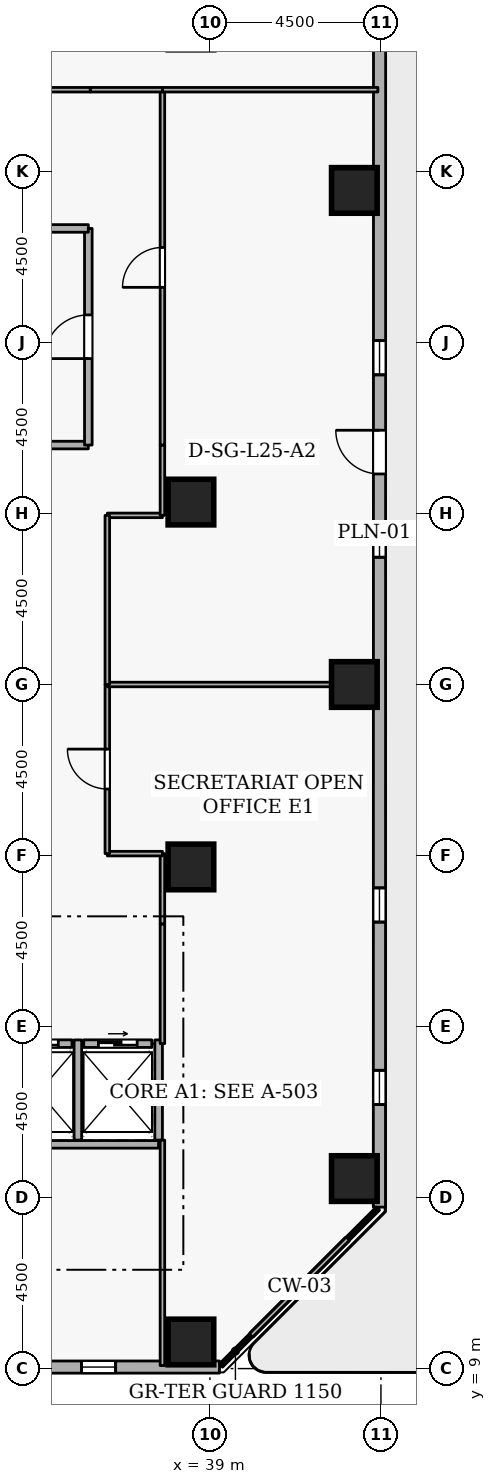
"""IFC4 building model, lengths in metres.
Left out: names, types, materials, properties, quantities, classifications, styles, units other than length and angle.
Written with IfcOpenShell. Run it as: python <this file> out.ifc"""

import sys

from ifc_helpers import new_model, si_unit, direction, frame, frame_2d, origin, origin_2d, place, context, subcontext, project, spatial, rectangle, extrude, element, fill, save


model = new_model("IFC4")
c1 = context("Model", 3, precision=1e-05, world=origin(), true_north=direction((0.0, 1.0)))
c2 = subcontext(c1, "Body", "Model", "MODEL_VIEW")
j1 = project(units=[si_unit("LENGTHUNIT", "METRE"), si_unit("PLANEANGLEUNIT", "RADIAN")], contexts=[c1])
p1 = place(None, origin())
s1 = spatial("IfcSite", under=j1, at=p1, CompositionType="ELEMENT")
p2 = place(p1, origin())
s2 = spatial("IfcBuilding", under=s1, at=p2, CompositionType="ELEMENT")
p3 = place(p2, frame((0.0, 0.0, 98.1)))
s3 = spatial("IfcBuildingStorey", under=s2, at=p3, CompositionType="ELEMENT", Elevation=98.1)
for number, where, z_axis, x_axis in (
    (1, (38.5, 9.7, 0.0), (0.0, 0.0, 1.0), (1.0, 0.0, 0.0)),
    (2, (42.8, 14.0, 0.0), (0.0, 0.0, 1.0), (1.0, 0.0, 0.0)),
    (3, (42.8, 27.0, 0.0), (0.0, 0.0, 1.0), (1.0, 0.0, 0.0)),
    (4, (42.8, 40.0, 0.0), (0.0, 0.0, 1.0), (1.0, 0.0, 0.0)),
    (5, (38.5, 22.2, 0.0), (0.0, 0.0, 1.0), (1.0, 0.0, 0.0)),
    (6, (38.5, 31.8, 0.0), (0.0, 0.0, 1.0), (1.0, 0.0, 0.0)),
):
    element("IfcColumn", number, at=place(p3, frame(where, z_axis=z_axis, x_axis=x_axis)), inside=s3, PredefinedType="COLUMN", context=c2, shape_type="SweptSolid", body=[
        extrude(rectangle(XDim=1.2, YDim=1.2, at=origin_2d()), origin(), (0.0, 0.0, 1.0), 3.6),
    ])
p4 = place(p3, frame((4.119, 9.035, 0.0), z_axis=(0.0, 0.0, 1.0), x_axis=(0.999999989352, 0.000145929605, 0.0)))
e7 = element("IfcWall", 7, at=p4, inside=s3, PredefinedType="STANDARD", context=c2, shape_type="SweptSolid", body=[
    extrude(rectangle(XDim=35.133, YDim=0.32, at=frame_2d((17.566, 0.0))), origin(), (0.0, 0.0, 1.0), 2.7),
])
p5 = place(p4, frame((2.7, 0.0, 0.72)))
e8 = element("IfcOpeningElement", 8, at=p5, cuts=e7, PredefinedType="OPENING", context=c2, shape_type="SweptSolid", body=[
    extrude(rectangle(XDim=0.9, YDim=1.75, at=frame_2d((0.45, 0.875))), frame((0.0, 0.17, 0.0), z_axis=(0.0, -1.0, 0.0), x_axis=(1.0, 0.0, 0.0)), (0.0, 0.0, 1.0), 0.34),
])
p6 = place(p4, frame((12.3, 0.0, 0.72)))
e9 = element("IfcOpeningElement", 9, at=p6, cuts=e7, PredefinedType="OPENING", context=c2, shape_type="SweptSolid", body=[
    extrude(rectangle(XDim=0.9, YDim=1.75, at=frame_2d((0.45, 0.875))), frame((0.0, 0.17, 0.0), z_axis=(0.0, -1.0, 0.0), x_axis=(1.0, 0.0, 0.0)), (0.0, 0.0, 1.0), 0.34),
])
p7 = place(p4, frame((17.1, 0.0, 0.72)))
e10 = element("IfcOpeningElement", 10, at=p7, cuts=e7, PredefinedType="OPENING", context=c2, shape_type="SweptSolid", body=[
    extrude(rectangle(XDim=0.9, YDim=1.75, at=frame_2d((0.45, 0.875))), frame((0.0, 0.17, 0.0), z_axis=(0.0, -1.0, 0.0), x_axis=(1.0, 0.0, 0.0)), (0.0, 0.0, 1.0), 0.34),
])
p8 = place(p4, frame((26.7, 0.0, 0.72)))
e11 = element("IfcOpeningElement", 11, at=p8, cuts=e7, PredefinedType="OPENING", context=c2, shape_type="SweptSolid", body=[
    extrude(rectangle(XDim=0.9, YDim=1.75, at=frame_2d((0.45, 0.875))), frame((0.0, 0.17, 0.0), z_axis=(0.0, -1.0, 0.0), x_axis=(1.0, 0.0, 0.0)), (0.0, 0.0, 1.0), 0.34),
])
p9 = place(p4, frame((31.5, 0.0, 0.72)))
e12 = element("IfcOpeningElement", 12, at=p9, cuts=e7, PredefinedType="OPENING", context=c2, shape_type="SweptSolid", body=[
    extrude(rectangle(XDim=0.9, YDim=1.75, at=frame_2d((0.45, 0.875))), frame((0.0, 0.17, 0.0), z_axis=(0.0, -1.0, 0.0), x_axis=(1.0, 0.0, 0.0)), (0.0, 0.0, 1.0), 0.34),
])
p10 = place(p3, frame((43.459, 13.248, 0.0), z_axis=(0.0, 0.0, 1.0), x_axis=(0.000145929605, 0.999999989352, 0.0)))
e13 = element("IfcWall", 13, at=p10, inside=s3, PredefinedType="STANDARD", context=c2, shape_type="SweptSolid", body=[
    extrude(rectangle(XDim=35.133, YDim=0.32, at=frame_2d((17.566, 0.0))), origin(), (0.0, 0.0, 1.0), 2.7),
])
p11 = place(p10, frame((19.292, 0.0, 0.0)))
e14 = element("IfcOpeningElement", 14, at=p11, cuts=e13, PredefinedType="OPENING", context=c2, shape_type="SweptSolid", body=[
    extrude(rectangle(XDim=1.15, YDim=2.1, at=frame_2d((0.575, 1.05))), frame((0.0, 0.17, 0.0), z_axis=(0.0, -1.0, 0.0), x_axis=(1.0, 0.0, 0.0)), (0.0, 0.0, 1.0), 0.34),
])
p12 = place(p10, frame((2.7, 0.0, 0.72)))
e15 = element("IfcOpeningElement", 15, at=p12, cuts=e13, PredefinedType="OPENING", context=c2, shape_type="SweptSolid", body=[
    extrude(rectangle(XDim=0.9, YDim=1.75, at=frame_2d((0.45, 0.875))), frame((0.0, 0.17, 0.0), z_axis=(0.0, -1.0, 0.0), x_axis=(1.0, 0.0, 0.0)), (0.0, 0.0, 1.0), 0.34),
])
p13 = place(p10, frame((7.5, 0.0, 0.72)))
e16 = element("IfcOpeningElement", 16, at=p13, cuts=e13, PredefinedType="OPENING", context=c2, shape_type="SweptSolid", body=[
    extrude(rectangle(XDim=0.9, YDim=1.75, at=frame_2d((0.45, 0.875))), frame((0.0, 0.17, 0.0), z_axis=(0.0, -1.0, 0.0), x_axis=(1.0, 0.0, 0.0)), (0.0, 0.0, 1.0), 0.34),
])
p14 = place(p10, frame((17.1, 0.0, 0.72)))
e17 = element("IfcOpeningElement", 17, at=p14, cuts=e13, PredefinedType="OPENING", context=c2, shape_type="SweptSolid", body=[
    extrude(rectangle(XDim=0.9, YDim=1.75, at=frame_2d((0.45, 0.875))), frame((0.0, 0.17, 0.0), z_axis=(0.0, -1.0, 0.0), x_axis=(1.0, 0.0, 0.0)), (0.0, 0.0, 1.0), 0.34),
])
p15 = place(p10, frame((21.9, 0.0, 0.72)))
e18 = element("IfcOpeningElement", 18, at=p15, cuts=e13, PredefinedType="OPENING", context=c2, shape_type="SweptSolid", body=[
    extrude(rectangle(XDim=0.9, YDim=1.75, at=frame_2d((0.45, 0.875))), frame((0.0, 0.17, 0.0), z_axis=(0.0, -1.0, 0.0), x_axis=(1.0, 0.0, 0.0)), (0.0, 0.0, 1.0), 0.34),
])
p16 = place(p10, frame((31.5, 0.0, 0.72)))
e19 = element("IfcOpeningElement", 19, at=p16, cuts=e13, PredefinedType="OPENING", context=c2, shape_type="SweptSolid", body=[
    extrude(rectangle(XDim=0.9, YDim=1.75, at=frame_2d((0.45, 0.875))), frame((0.0, 0.17, 0.0), z_axis=(0.0, -1.0, 0.0), x_axis=(1.0, 0.0, 0.0)), (0.0, 0.0, 1.0), 0.34),
])
p17 = place(p3, frame((33.63, 17.55, 0.0), z_axis=(0.0, 0.0, 1.0), x_axis=(1.0, 0.0, 0.0)))
e20 = element("IfcWall", 20, at=p17, inside=s3, PredefinedType="STANDARD", context=c2, shape_type="SweptSolid", body=[
    extrude(rectangle(XDim=1.74, YDim=0.2, at=frame_2d((0.87, 0.0))), origin(), (0.0, 0.0, 1.0), 3.3),
])
p18 = place(p17, frame((0.36, 0.0, 0.0)))
e21 = element("IfcOpeningElement", 21, at=p18, cuts=e20, PredefinedType="OPENING", context=c2, shape_type="SweptSolid", body=[
    extrude(rectangle(XDim=1.02, YDim=2.06, at=frame_2d((0.51, 1.03))), frame((0.0, 0.11, 0.0), z_axis=(0.0, -1.0, 0.0), x_axis=(1.0, 0.0, 0.0)), (0.0, 0.0, 1.0), 0.22),
])
p19 = place(p3, frame((35.68, 17.55, 0.0), z_axis=(0.0, 0.0, 1.0), x_axis=(1.0, 0.0, 0.0)))
e22 = element("IfcWall", 22, at=p19, inside=s3, PredefinedType="STANDARD", context=c2, shape_type="SweptSolid", body=[
    extrude(rectangle(XDim=1.79, YDim=0.2, at=frame_2d((0.895, 0.0))), origin(), (0.0, 0.0, 1.0), 3.3),
])
p20 = place(p19, frame((0.385, 0.0, 0.0)))
e23 = element("IfcOpeningElement", 23, at=p20, cuts=e22, PredefinedType="OPENING", context=c2, shape_type="SweptSolid", body=[
    extrude(rectangle(XDim=1.02, YDim=2.06, at=frame_2d((0.51, 1.03))), frame((0.0, 0.11, 0.0), z_axis=(0.0, -1.0, 0.0), x_axis=(1.0, 0.0, 0.0)), (0.0, 0.0, 1.0), 0.22),
])
p21 = place(p3, frame((33.452, 14.9, 0.0), z_axis=(0.0, 0.0, 1.0), x_axis=(1.0, 0.0, 0.0)))
e24 = element("IfcWall", 24, at=p21, inside=s3, PredefinedType="STANDARD", context=c2, shape_type="SweptSolid", body=[
    extrude(rectangle(XDim=4.196, YDim=0.2, at=frame_2d((2.098, 0.0))), origin(), (0.0, 0.0, 1.0), 3.3),
])
for number, where, z_axis, x_axis in (
    (25, (35.525, 15.012, 0.0), (0.0, 0.0, 1.0), (0.0, 1.0, 0.0)),
    (26, (37.65, 15.012, 0.0), (0.0, 0.0, 1.0), (0.0, 1.0, 0.0)),
):
    element("IfcWall", number, at=place(p3, frame(where, z_axis=z_axis, x_axis=x_axis)), inside=s3, PredefinedType="STANDARD", context=c2, shape_type="SweptSolid", body=[
        extrude(rectangle(XDim=2.636, YDim=0.2, at=frame_2d((1.318, 0.0))), origin(), (0.0, 0.0, 1.0), 3.3),
    ])
p22 = place(p3, frame((33.3, 33.3, 0.0), z_axis=(0.0, 0.0, 1.0), x_axis=(1.0, 0.0, 0.0)))
e27 = element("IfcWall", 27, at=p22, inside=s3, PredefinedType="STANDARD", context=c2, shape_type="SweptSolid", body=[
    extrude(rectangle(XDim=2.5, YDim=0.2, at=frame_2d((1.25, 0.0))), origin(), (0.0, 0.0, 1.0), 3.3),
])
p23 = place(p3, frame((35.8, 33.3, 0.0), z_axis=(0.0, 0.0, 1.0), x_axis=(0.0, 1.0, 0.0)))
e28 = element("IfcWall", 28, at=p23, inside=s3, PredefinedType="STANDARD", context=c2, shape_type="SweptSolid", body=[
    extrude(rectangle(XDim=5.7, YDim=0.2, at=frame_2d((2.85, 0.0))), origin(), (0.0, 0.0, 1.0), 3.3),
])
p24 = place(p23, frame((2.275, 0.0, 0.0)))
e29 = element("IfcOpeningElement", 29, at=p24, cuts=e28, PredefinedType="OPENING", context=c2, shape_type="SweptSolid", body=[
    extrude(rectangle(XDim=1.15, YDim=2.1, at=frame_2d((0.575, 1.05))), frame((0.0, 0.11, 0.0), z_axis=(0.0, -1.0, 0.0), x_axis=(1.0, 0.0, 0.0)), (0.0, 0.0, 1.0), 0.22),
])
p25 = place(p3, frame((35.8, 39.0, 0.0), z_axis=(0.0, 0.0, 1.0), x_axis=(-1.0, 0.0, 0.0)))
e30 = element("IfcWall", 30, at=p25, inside=s3, PredefinedType="STANDARD", context=c2, shape_type="SweptSolid", body=[
    extrude(rectangle(XDim=2.5, YDim=0.2, at=frame_2d((1.25, 0.0))), origin(), (0.0, 0.0, 1.0), 3.3),
])
p26 = place(p3, frame((37.75, 17.55, 0.0), z_axis=(0.0, 0.0, 1.0), x_axis=(0.0, 1.0, 0.0)))
e31 = element("IfcWall", 31, at=p26, inside=s3, PredefinedType="PARTITIONING", context=c2, shape_type="SweptSolid", body=[
    extrude(rectangle(XDim=3.15, YDim=0.12, at=frame_2d((1.575, 0.0))), origin(), (0.0, 0.0, 1.0), 3.3),
])
p27 = place(p3, frame((37.75, 20.7, 0.0), z_axis=(0.0, 0.0, 1.0), x_axis=(0.0, 1.0, 0.0)))
e32 = element("IfcWall", 32, at=p27, inside=s3, PredefinedType="PARTITIONING", context=c2, shape_type="SweptSolid", body=[
    extrude(rectangle(XDim=1.85, YDim=0.12, at=frame_2d((0.925, 0.0))), origin(), (0.0, 0.0, 1.0), 3.3),
])
p28 = place(p3, frame((37.75, 22.55, 0.0), z_axis=(0.0, 0.0, 1.0), x_axis=(-1.0, 0.0, 0.0)))
e33 = element("IfcWall", 33, at=p28, inside=s3, PredefinedType="PARTITIONING", context=c2, shape_type="SweptSolid", body=[
    extrude(rectangle(XDim=1.45, YDim=0.12, at=frame_2d((0.725, 0.0))), origin(), (0.0, 0.0, 1.0), 3.3),
])
p29 = place(p3, frame((36.3, 22.55, 0.0), z_axis=(0.0, 0.0, 1.0), x_axis=(0.0, 1.0, 0.0)))
e34 = element("IfcWall", 34, at=p29, inside=s3, PredefinedType="PARTITIONING", context=c2, shape_type="SweptSolid", body=[
    extrude(rectangle(XDim=4.45, YDim=0.12, at=frame_2d((2.225, 0.0))), origin(), (0.0, 0.0, 1.0), 3.3),
])
p30 = place(p29, frame((1.7, 0.0, 0.0)))
e35 = element("IfcOpeningElement", 35, at=p30, cuts=e34, PredefinedType="OPENING", context=c2, shape_type="SweptSolid", body=[
    extrude(rectangle(XDim=1.05, YDim=2.1, at=frame_2d((0.525, 1.05))), frame((0.0, 0.07, 0.0), z_axis=(0.0, -1.0, 0.0), x_axis=(1.0, 0.0, 0.0)), (0.0, 0.0, 1.0), 0.14),
])
p31 = place(p3, frame((36.3, 27.0, 0.0), z_axis=(0.0, 0.0, 1.0), x_axis=(1.0, 0.0, 0.0)))
e36 = element("IfcWall", 36, at=p31, inside=s3, PredefinedType="PARTITIONING", context=c2, shape_type="SweptSolid", body=[
    extrude(rectangle(XDim=7.12, YDim=0.12, at=frame_2d((3.56, 0.0))), origin(), (0.0, 0.0, 1.0), 2.838),
])
p32 = place(p3, frame((43.42, 13.211, 0.0), z_axis=(0.0, 0.0, 1.0), x_axis=(-0.707106781187, -0.707106781187, 0.0)))
e37 = element("IfcWall", 37, at=p32, inside=s3, PredefinedType="PARTITIONING", context=c2, shape_type="SweptSolid", body=[
    extrude(rectangle(XDim=5.842, YDim=0.12, at=frame_2d((2.921, 0.0))), origin(), (0.0, 0.0, 1.0), 3.3),
])
p33 = place(p3, frame((37.75, 9.08, 0.0), z_axis=(0.0, 0.0, 1.0), x_axis=(0.0, 1.0, 0.0)))
e38 = element("IfcWall", 38, at=p33, inside=s3, PredefinedType="PARTITIONING", context=c2, shape_type="SweptSolid", body=[
    extrude(rectangle(XDim=5.932, YDim=0.12, at=frame_2d((2.966, 0.0))), origin(), (0.0, 0.0, 1.0), 3.3),
])
p34 = place(p3, frame((36.3, 31.45, 0.0), z_axis=(0.0, 0.0, 1.0), x_axis=(1.0, 0.0, 0.0)))
e39 = element("IfcWall", 39, at=p34, inside=s3, PredefinedType="PARTITIONING", context=c2, shape_type="SweptSolid", body=[
    extrude(rectangle(XDim=1.45, YDim=0.12, at=frame_2d((0.725, 0.0))), origin(), (0.0, 0.0, 1.0), 3.3),
])
p35 = place(p3, frame((37.75, 31.45, 0.0), z_axis=(0.0, 0.0, 1.0), x_axis=(0.0, 1.0, 0.0)))
e40 = element("IfcWall", 40, at=p35, inside=s3, PredefinedType="PARTITIONING", context=c2, shape_type="SweptSolid", body=[
    extrude(rectangle(XDim=1.85, YDim=0.12, at=frame_2d((0.925, 0.0))), origin(), (0.0, 0.0, 1.0), 3.3),
])
p36 = place(p3, frame((37.75, 33.3, 0.0), z_axis=(0.0, 0.0, 1.0), x_axis=(0.0, 1.0, 0.0)))
e41 = element("IfcWall", 41, at=p36, inside=s3, PredefinedType="PARTITIONING", context=c2, shape_type="SweptSolid", body=[
    extrude(rectangle(XDim=9.35, YDim=0.12, at=frame_2d((4.675, 0.0))), origin(), (0.0, 0.0, 1.0), 3.3),
])
p37 = place(p36, frame((4.15, 0.0, 0.0)))
e42 = element("IfcOpeningElement", 42, at=p37, cuts=e41, PredefinedType="OPENING", context=c2, shape_type="SweptSolid", body=[
    extrude(rectangle(XDim=1.05, YDim=2.1, at=frame_2d((0.525, 1.05))), frame((0.0, 0.07, 0.0), z_axis=(0.0, -1.0, 0.0), x_axis=(1.0, 0.0, 0.0)), (0.0, 0.0, 1.0), 0.14),
])
p38 = place(p3, frame((37.75, 42.65, 0.0), z_axis=(0.0, 0.0, 1.0), x_axis=(1.0, 0.0, 0.0)))
e43 = element("IfcWall", 43, at=p38, inside=s3, PredefinedType="PARTITIONING", context=c2, shape_type="SweptSolid", body=[
    extrude(rectangle(XDim=5.67, YDim=0.12, at=frame_2d((2.835, 0.0))), origin(), (0.0, 0.0, 1.0), 3.3),
])
p39 = place(p3, frame((36.3, 27.0, 0.0), z_axis=(0.0, 0.0, 1.0), x_axis=(0.0, 1.0, 0.0)))
e44 = element("IfcWall", 44, at=p39, inside=s3, PredefinedType="PARTITIONING", context=c2, shape_type="SweptSolid", body=[
    extrude(rectangle(XDim=4.45, YDim=0.12, at=frame_2d((2.225, 0.0))), origin(), (0.0, 0.0, 1.0), 3.3),
])
p40 = place(p3, frame((37.75, 42.65, 0.0), z_axis=(0.0, 0.0, 1.0), x_axis=(-1.0, 0.0, 0.0)))
e45 = element("IfcWall", 45, at=p40, inside=s3, PredefinedType="PARTITIONING", context=c2, shape_type="SweptSolid", body=[
    extrude(rectangle(XDim=1.9, YDim=0.12, at=frame_2d((0.95, 0.0))), origin(), (0.0, 0.0, 1.0), 3.3),
])
p41 = place(p3, frame((35.85, 42.65, 0.0), z_axis=(0.0, 0.0, 1.0), x_axis=(-1.0, 0.0, 0.0)))
e46 = element("IfcWall", 46, at=p41, inside=s3, PredefinedType="PARTITIONING", context=c2, shape_type="SweptSolid", body=[
    extrude(rectangle(XDim=10.35, YDim=0.12, at=frame_2d((5.175, 0.0))), origin(), (0.0, 0.0, 1.0), 2.855),
])
p42 = place(p41, frame((4.65, 0.0, 0.0)))
e47 = element("IfcOpeningElement", 47, at=p42, cuts=e46, PredefinedType="OPENING", context=c2, shape_type="SweptSolid", body=[
    extrude(rectangle(XDim=1.05, YDim=2.1, at=frame_2d((0.525, 1.05))), frame((0.0, 0.07, 0.0), z_axis=(0.0, -1.0, 0.0), x_axis=(1.0, 0.0, 0.0)), (0.0, 0.0, 1.0), 0.14),
])
p43 = place(p9, origin())
e48 = element("IfcWindow", 48, at=p43, inside=s3, PartitioningType="SINGLE_PANEL", PredefinedType="WINDOW", context=c2, shape_type="SweptSolid", body=[
    extrude(rectangle(XDim=0.9, YDim=1.75, at=frame_2d((0.45, 0.875))), frame((0.0, 0.03, 0.0), z_axis=(0.0, -1.0, 0.0), x_axis=(1.0, 0.0, 0.0)), (0.0, 0.0, 1.0), 0.06),
])
fill(e12, e48)
p44 = place(p11, origin())
e49 = element("IfcDoor", 49, at=p44, inside=s3, OperationType="SINGLE_SWING_RIGHT", PredefinedType="DOOR", context=c2, shape_type="SweptSolid", body=[
    extrude(rectangle(XDim=1.15, YDim=2.1, at=frame_2d((0.575, 1.05))), frame((0.0, 0.025, 0.0), z_axis=(0.0, -1.0, 0.0), x_axis=(1.0, 0.0, 0.0)), (0.0, 0.0, 1.0), 0.05),
])
fill(e14, e49)
p45 = place(p12, origin())
e50 = element("IfcWindow", 50, at=p45, inside=s3, PartitioningType="SINGLE_PANEL", PredefinedType="WINDOW", context=c2, shape_type="SweptSolid", body=[
    extrude(rectangle(XDim=0.9, YDim=1.75, at=frame_2d((0.45, 0.875))), frame((0.0, 0.03, 0.0), z_axis=(0.0, -1.0, 0.0), x_axis=(1.0, 0.0, 0.0)), (0.0, 0.0, 1.0), 0.06),
])
fill(e15, e50)
p46 = place(p13, origin())
e51 = element("IfcWindow", 51, at=p46, inside=s3, PartitioningType="SINGLE_PANEL", PredefinedType="WINDOW", context=c2, shape_type="SweptSolid", body=[
    extrude(rectangle(XDim=0.9, YDim=1.75, at=frame_2d((0.45, 0.875))), frame((0.0, 0.03, 0.0), z_axis=(0.0, -1.0, 0.0), x_axis=(1.0, 0.0, 0.0)), (0.0, 0.0, 1.0), 0.06),
])
fill(e16, e51)
p47 = place(p14, origin())
e52 = element("IfcWindow", 52, at=p47, inside=s3, PartitioningType="SINGLE_PANEL", PredefinedType="WINDOW", context=c2, shape_type="SweptSolid", body=[
    extrude(rectangle(XDim=0.9, YDim=1.75, at=frame_2d((0.45, 0.875))), frame((0.0, 0.03, 0.0), z_axis=(0.0, -1.0, 0.0), x_axis=(1.0, 0.0, 0.0)), (0.0, 0.0, 1.0), 0.06),
])
fill(e17, e52)
p48 = place(p15, origin())
e53 = element("IfcWindow", 53, at=p48, inside=s3, PartitioningType="SINGLE_PANEL", PredefinedType="WINDOW", context=c2, shape_type="SweptSolid", body=[
    extrude(rectangle(XDim=0.9, YDim=1.75, at=frame_2d((0.45, 0.875))), frame((0.0, 0.03, 0.0), z_axis=(0.0, -1.0, 0.0), x_axis=(1.0, 0.0, 0.0)), (0.0, 0.0, 1.0), 0.06),
])
fill(e18, e53)
p49 = place(p18, origin())
e54 = element("IfcDoor", 54, at=p49, inside=s3, OperationType="SLIDING_TO_LEFT", PredefinedType="DOOR", context=c2, shape_type="SweptSolid", body=[
    extrude(rectangle(XDim=1.02, YDim=2.06, at=frame_2d((0.51, 1.03))), frame((0.0, 0.025, 0.0), z_axis=(0.0, -1.0, 0.0), x_axis=(1.0, 0.0, 0.0)), (0.0, 0.0, 1.0), 0.05),
])
fill(e21, e54)
p50 = place(p20, origin())
e55 = element("IfcDoor", 55, at=p50, inside=s3, OperationType="SLIDING_TO_LEFT", PredefinedType="DOOR", context=c2, shape_type="SweptSolid", body=[
    extrude(rectangle(XDim=1.02, YDim=2.06, at=frame_2d((0.51, 1.03))), frame((0.0, 0.025, 0.0), z_axis=(0.0, -1.0, 0.0), x_axis=(1.0, 0.0, 0.0)), (0.0, 0.0, 1.0), 0.05),
])
fill(e23, e55)
p51 = place(p24, origin())
e56 = element("IfcDoor", 56, at=p51, inside=s3, OperationType="SINGLE_SWING_LEFT", PredefinedType="DOOR", context=c2, shape_type="SweptSolid", body=[
    extrude(rectangle(XDim=1.15, YDim=2.1, at=frame_2d((0.575, 1.05))), frame((0.0, 0.025, 0.0), z_axis=(0.0, -1.0, 0.0), x_axis=(1.0, 0.0, 0.0)), (0.0, 0.0, 1.0), 0.05),
])
fill(e29, e56)
p52 = place(p30, origin())
e57 = element("IfcDoor", 57, at=p52, inside=s3, OperationType="SINGLE_SWING_RIGHT", PredefinedType="DOOR", context=c2, shape_type="SweptSolid", body=[
    extrude(rectangle(XDim=1.05, YDim=2.1, at=frame_2d((0.525, 1.05))), frame((0.0, 0.025, 0.0), z_axis=(0.0, -1.0, 0.0), x_axis=(1.0, 0.0, 0.0)), (0.0, 0.0, 1.0), 0.05),
])
fill(e35, e57)
p53 = place(p37, origin())
e58 = element("IfcDoor", 58, at=p53, inside=s3, OperationType="SINGLE_SWING_LEFT", PredefinedType="DOOR", context=c2, shape_type="SweptSolid", body=[
    extrude(rectangle(XDim=1.05, YDim=2.1, at=frame_2d((0.525, 1.05))), frame((0.0, 0.025, 0.0), z_axis=(0.0, -1.0, 0.0), x_axis=(1.0, 0.0, 0.0)), (0.0, 0.0, 1.0), 0.05),
])
fill(e42, e58)
save(model, sys.argv[1])
